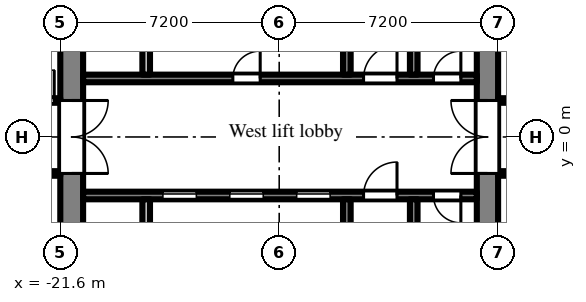
"""IFC4 building model, lengths in metres.
Left out: names, types, materials, properties, quantities, classifications, styles, units other than length and angle.
Written with IfcOpenShell. Run it as: python <this file> out.ifc"""

import sys

from ifc_helpers import new_model, si_unit, direction, frame, frame_2d, origin, place, context, subcontext, project, spatial, rectangle, extrude, element, fill, save


model = new_model("IFC4")
c1 = context("Model", 3, precision=1e-05, world=origin(), true_north=direction((0.0, 1.0)))
c2 = subcontext(c1, "Body", "Model", "MODEL_VIEW")
j1 = project(units=[si_unit("LENGTHUNIT", "METRE"), si_unit("PLANEANGLEUNIT", "RADIAN")], contexts=[c1])
p1 = place(None, origin())
s1 = spatial("IfcSite", under=j1, at=p1, CompositionType="ELEMENT")
p2 = place(p1, origin())
s2 = spatial("IfcBuilding", under=s1, at=p2, CompositionType="ELEMENT")
p3 = place(p2, frame((0.0, 0.0, 66.9)))
s3 = spatial("IfcBuildingStorey", under=s2, at=p3, CompositionType="ELEMENT", Elevation=66.9)
p4 = place(p3, frame((-7.55, -7.2, 0.0), z_axis=(0.0, 0.0, 1.0), x_axis=(0.0, 1.0, 0.0)))
e1 = element("IfcWall", 1, at=p4, inside=s3, PredefinedType="SHEAR", context=c2, shape_type="SweptSolid", body=[
    extrude(rectangle(XDim=14.4, YDim=0.7, at=frame_2d((7.2, 0.0))), origin(), (0.0, 0.0, 1.0), 2.575),
])
p5 = place(p4, frame((6.0, 0.0, 0.0)))
e2 = element("IfcOpeningElement", 2, at=p5, cuts=e1, PredefinedType="OPENING", context=c2, shape_type="SweptSolid", body=[
    extrude(rectangle(XDim=2.4, YDim=2.2, at=frame_2d((1.2, 1.1))), frame((0.0, 0.36, 0.0), z_axis=(0.0, -1.0, 0.0), x_axis=(1.0, 0.0, 0.0)), (0.0, 0.0, 1.0), 0.72),
])
p6 = place(p3, frame((-21.225, -7.2, 0.0), z_axis=(0.0, 0.0, 1.0), x_axis=(0.0, 1.0, 0.0)))
e3 = element("IfcWall", 3, at=p6, inside=s3, PredefinedType="SHEAR", context=c2, shape_type="SweptSolid", body=[
    extrude(rectangle(XDim=14.4, YDim=0.75, at=frame_2d((7.2, 0.0))), origin(), (0.0, 0.0, 1.0), 2.575),
])
p7 = place(p6, frame((6.0, 0.0, 0.0)))
e4 = element("IfcOpeningElement", 4, at=p7, cuts=e3, PredefinedType="OPENING", context=c2, shape_type="SweptSolid", body=[
    extrude(rectangle(XDim=2.4, YDim=2.2, at=frame_2d((1.2, 1.1))), frame((0.0, 0.385, 0.0), z_axis=(0.0, -1.0, 0.0), x_axis=(1.0, 0.0, 0.0)), (0.0, 0.0, 1.0), 0.77),
])
p8 = place(p3, frame((-7.9, 1.925, 0.0), z_axis=(0.0, 0.0, 1.0), x_axis=(-1.0, 0.0, 0.0)))
e5 = element("IfcWall", 5, at=p8, inside=s3, PredefinedType="SHEAR", context=c2, shape_type="SweptSolid", body=[
    extrude(rectangle(XDim=12.95, YDim=0.25, at=frame_2d((6.475, 0.0))), origin(), (0.0, 0.0, 1.0), 2.575),
])
p9 = place(p8, frame((0.525, 0.0, 0.0)))
e6 = element("IfcOpeningElement", 6, at=p9, cuts=e5, PredefinedType="OPENING", context=c2, shape_type="SweptSolid", body=[
    extrude(rectangle(XDim=0.9, YDim=2.1, at=frame_2d((0.45, 1.05))), frame((0.0, 0.135, 0.0), z_axis=(0.0, -1.0, 0.0), x_axis=(1.0, 0.0, 0.0)), (0.0, 0.0, 1.0), 0.27),
])
p10 = place(p8, frame((2.625, 0.0, 0.0)))
e7 = element("IfcOpeningElement", 7, at=p10, cuts=e5, PredefinedType="OPENING", context=c2, shape_type="SweptSolid", body=[
    extrude(rectangle(XDim=1.1, YDim=2.1, at=frame_2d((0.55, 1.05))), frame((0.0, 0.135, 0.0), z_axis=(0.0, -1.0, 0.0), x_axis=(1.0, 0.0, 0.0)), (0.0, 0.0, 1.0), 0.27),
])
p11 = place(p8, frame((7.125, 0.0, 0.0)))
e8 = element("IfcOpeningElement", 8, at=p11, cuts=e5, PredefinedType="OPENING", context=c2, shape_type="SweptSolid", body=[
    extrude(rectangle(XDim=0.9, YDim=2.1, at=frame_2d((0.45, 1.05))), frame((0.0, 0.135, 0.0), z_axis=(0.0, -1.0, 0.0), x_axis=(1.0, 0.0, 0.0)), (0.0, 0.0, 1.0), 0.27),
])
p12 = place(p3, frame((-9.975, 2.05, 0.0), z_axis=(0.0, 0.0, 1.0), x_axis=(0.0, 1.0, 0.0)))
e9 = element("IfcWall", 9, at=p12, inside=s3, PredefinedType="SHEAR", context=c2, shape_type="SweptSolid", body=[
    extrude(rectangle(XDim=4.65, YDim=0.25, at=frame_2d((2.325, 0.0))), origin(), (0.0, 0.0, 1.0), 2.575),
])
p13 = place(p12, frame((2.95, 0.0, 0.0)))
e10 = element("IfcOpeningElement", 10, at=p13, cuts=e9, PredefinedType="OPENING", context=c2, shape_type="SweptSolid", body=[
    extrude(rectangle(XDim=1.1, YDim=2.1, at=frame_2d((0.55, 1.05))), frame((0.0, 0.135, 0.0), z_axis=(0.0, -1.0, 0.0), x_axis=(1.0, 0.0, 0.0)), (0.0, 0.0, 1.0), 0.27),
])
p14 = place(p3, frame((-12.175, 2.05, 0.0), z_axis=(0.0, 0.0, 1.0), x_axis=(0.0, 1.0, 0.0)))
e11 = element("IfcWall", 11, at=p14, inside=s3, PredefinedType="SHEAR", context=c2, shape_type="SweptSolid", body=[
    extrude(rectangle(XDim=4.65, YDim=0.25, at=frame_2d((2.325, 0.0))), origin(), (0.0, 0.0, 1.0), 2.575),
])
p15 = place(p14, frame((2.95, 0.0, 0.0)))
e12 = element("IfcOpeningElement", 12, at=p15, cuts=e11, PredefinedType="OPENING", context=c2, shape_type="SweptSolid", body=[
    extrude(rectangle(XDim=1.1, YDim=2.1, at=frame_2d((0.55, 1.05))), frame((0.0, 0.135, 0.0), z_axis=(0.0, -1.0, 0.0), x_axis=(1.0, 0.0, 0.0)), (0.0, 0.0, 1.0), 0.27),
])
p16 = place(p3, frame((-18.775, 2.05, 0.0), z_axis=(0.0, 0.0, 1.0), x_axis=(0.0, 1.0, 0.0)))
e13 = element("IfcWall", 13, at=p16, inside=s3, PredefinedType="PARTITIONING", context=c2, shape_type="SweptSolid", body=[
    extrude(rectangle(XDim=2.1, YDim=0.25, at=frame_2d((1.05, 0.0))), origin(), (0.0, 0.0, 1.0), 2.575),
])
p17 = place(p3, frame((-7.9, -1.925, 0.0), z_axis=(0.0, 0.0, 1.0), x_axis=(-1.0, 0.0, 0.0)))
e14 = element("IfcWall", 14, at=p17, inside=s3, PredefinedType="SHEAR", context=c2, shape_type="SweptSolid", body=[
    extrude(rectangle(XDim=12.95, YDim=0.25, at=frame_2d((6.475, 0.0))), origin(), (0.0, 0.0, 1.0), 2.575),
])
p18 = place(p17, frame((4.825, 0.0, 0.0)))
e15 = element("IfcOpeningElement", 15, at=p18, cuts=e14, PredefinedType="OPENING", context=c2, shape_type="SweptSolid", body=[
    extrude(rectangle(XDim=1.1, YDim=2.1, at=frame_2d((0.55, 1.05))), frame((0.0, 0.135, 0.0), z_axis=(0.0, -1.0, 0.0), x_axis=(1.0, 0.0, 0.0)), (0.0, 0.0, 1.0), 0.27),
])
p19 = place(p17, frame((7.025, 0.0, 0.0)))
e16 = element("IfcOpeningElement", 16, at=p19, cuts=e14, PredefinedType="OPENING", context=c2, shape_type="SweptSolid", body=[
    extrude(rectangle(XDim=1.1, YDim=2.1, at=frame_2d((0.55, 1.05))), frame((0.0, 0.135, 0.0), z_axis=(0.0, -1.0, 0.0), x_axis=(1.0, 0.0, 0.0)), (0.0, 0.0, 1.0), 0.27),
])
p20 = place(p17, frame((9.225, 0.0, 0.0)))
e17 = element("IfcOpeningElement", 17, at=p20, cuts=e14, PredefinedType="OPENING", context=c2, shape_type="SweptSolid", body=[
    extrude(rectangle(XDim=1.1, YDim=2.1, at=frame_2d((0.55, 1.05))), frame((0.0, 0.135, 0.0), z_axis=(0.0, -1.0, 0.0), x_axis=(1.0, 0.0, 0.0)), (0.0, 0.0, 1.0), 0.27),
])
p21 = place(p17, frame((0.525, 0.0, 0.0)))
e18 = element("IfcOpeningElement", 18, at=p21, cuts=e14, PredefinedType="OPENING", context=c2, shape_type="SweptSolid", body=[
    extrude(rectangle(XDim=0.9, YDim=2.1, at=frame_2d((0.45, 1.05))), frame((0.0, 0.135, 0.0), z_axis=(0.0, -1.0, 0.0), x_axis=(1.0, 0.0, 0.0)), (0.0, 0.0, 1.0), 0.27),
])
p22 = place(p17, frame((2.625, 0.0, 0.0)))
e19 = element("IfcOpeningElement", 19, at=p22, cuts=e14, PredefinedType="OPENING", context=c2, shape_type="SweptSolid", body=[
    extrude(rectangle(XDim=1.1, YDim=2.1, at=frame_2d((0.55, 1.05))), frame((0.0, 0.135, 0.0), z_axis=(0.0, -1.0, 0.0), x_axis=(1.0, 0.0, 0.0)), (0.0, 0.0, 1.0), 0.27),
])
p23 = place(p3, frame((-9.975, -2.05, 0.0), z_axis=(0.0, 0.0, 1.0), x_axis=(0.0, -1.0, 0.0)))
e20 = element("IfcWall", 20, at=p23, inside=s3, PredefinedType="SHEAR", context=c2, shape_type="SweptSolid", body=[
    extrude(rectangle(XDim=4.65, YDim=0.25, at=frame_2d((2.325, 0.0))), origin(), (0.0, 0.0, 1.0), 2.575),
])
p24 = place(p23, frame((2.95, 0.0, 0.0)))
e21 = element("IfcOpeningElement", 21, at=p24, cuts=e20, PredefinedType="OPENING", context=c2, shape_type="SweptSolid", body=[
    extrude(rectangle(XDim=1.1, YDim=2.1, at=frame_2d((0.55, 1.05))), frame((0.0, 0.135, 0.0), z_axis=(0.0, -1.0, 0.0), x_axis=(1.0, 0.0, 0.0)), (0.0, 0.0, 1.0), 0.27),
])
p25 = place(p3, frame((-12.175, -2.05, 0.0), z_axis=(0.0, 0.0, 1.0), x_axis=(0.0, -1.0, 0.0)))
e22 = element("IfcWall", 22, at=p25, inside=s3, PredefinedType="SHEAR", context=c2, shape_type="SweptSolid", body=[
    extrude(rectangle(XDim=4.65, YDim=0.25, at=frame_2d((2.325, 0.0))), origin(), (0.0, 0.0, 1.0), 2.575),
])
p26 = place(p25, frame((2.95, 0.0, 0.0)))
e23 = element("IfcOpeningElement", 23, at=p26, cuts=e22, PredefinedType="OPENING", context=c2, shape_type="SweptSolid", body=[
    extrude(rectangle(XDim=1.1, YDim=2.1, at=frame_2d((0.55, 1.05))), frame((0.0, 0.135, 0.0), z_axis=(0.0, -1.0, 0.0), x_axis=(1.0, 0.0, 0.0)), (0.0, 0.0, 1.0), 0.27),
])
p27 = place(p3, frame((-18.775, -2.05, 0.0), z_axis=(0.0, 0.0, 1.0), x_axis=(0.0, -1.0, 0.0)))
e24 = element("IfcWall", 24, at=p27, inside=s3, PredefinedType="PARTITIONING", context=c2, shape_type="SweptSolid", body=[
    extrude(rectangle(XDim=2.1, YDim=0.25, at=frame_2d((1.05, 0.0))), origin(), (0.0, 0.0, 1.0), 2.575),
])
p28 = place(p3, frame((-36.5, -1.2, 0.0), z_axis=(0.0, 0.0, 1.0), x_axis=(1.0, 0.0, 0.0)))
e25 = element("IfcWall", 25, at=p28, inside=s3, PredefinedType="PARTITIONING", context=c2, shape_type="SweptSolid", body=[
    extrude(rectangle(XDim=14.9, YDim=0.15, at=frame_2d((7.45, 0.0))), origin(), (0.0, 0.0, 1.0), 2.575),
])
p29 = place(p28, frame((12.65, 0.0, 0.0)))
e26 = element("IfcOpeningElement", 26, at=p29, cuts=e25, PredefinedType="OPENING", context=c2, shape_type="SweptSolid", body=[
    extrude(rectangle(XDim=0.9, YDim=2.1, at=frame_2d((0.45, 1.05))), frame((0.0, 0.085, 0.0), z_axis=(0.0, -1.0, 0.0), x_axis=(1.0, 0.0, 0.0)), (0.0, 0.0, 1.0), 0.17),
])
p30 = place(p28, frame((9.95, 0.0, 0.0)))
e27 = element("IfcOpeningElement", 27, at=p30, cuts=e25, PredefinedType="OPENING", context=c2, shape_type="SweptSolid", body=[
    extrude(rectangle(XDim=0.9, YDim=2.1, at=frame_2d((0.45, 1.05))), frame((0.0, 0.085, 0.0), z_axis=(0.0, -1.0, 0.0), x_axis=(1.0, 0.0, 0.0)), (0.0, 0.0, 1.0), 0.17),
])
p31 = place(p28, frame((8.15, 0.0, 0.0)))
e28 = element("IfcOpeningElement", 28, at=p31, cuts=e25, PredefinedType="OPENING", context=c2, shape_type="SweptSolid", body=[
    extrude(rectangle(XDim=0.9, YDim=2.1, at=frame_2d((0.45, 1.05))), frame((0.0, 0.085, 0.0), z_axis=(0.0, -1.0, 0.0), x_axis=(1.0, 0.0, 0.0)), (0.0, 0.0, 1.0), 0.17),
])
p32 = place(p28, frame((6.1, 0.0, 0.0)))
e29 = element("IfcOpeningElement", 29, at=p32, cuts=e25, PredefinedType="OPENING", context=c2, shape_type="SweptSolid", body=[
    extrude(rectangle(XDim=1.0, YDim=2.1, at=frame_2d((0.5, 1.05))), frame((0.0, 0.085, 0.0), z_axis=(0.0, -1.0, 0.0), x_axis=(1.0, 0.0, 0.0)), (0.0, 0.0, 1.0), 0.17),
])
p33 = place(p28, frame((1.15, 0.0, 0.0)))
e30 = element("IfcOpeningElement", 30, at=p33, cuts=e25, PredefinedType="OPENING", context=c2, shape_type="SweptSolid", body=[
    extrude(rectangle(XDim=1.8, YDim=2.1, at=frame_2d((0.9, 1.05))), frame((0.0, 0.085, 0.0), z_axis=(0.0, -1.0, 0.0), x_axis=(1.0, 0.0, 0.0)), (0.0, 0.0, 1.0), 0.17),
])
p34 = place(p3, frame((-36.5, 1.2, 0.0), z_axis=(0.0, 0.0, 1.0), x_axis=(1.0, 0.0, 0.0)))
e31 = element("IfcWall", 31, at=p34, inside=s3, PredefinedType="PARTITIONING", context=c2, shape_type="SweptSolid", body=[
    extrude(rectangle(XDim=14.9, YDim=0.15, at=frame_2d((7.45, 0.0))), origin(), (0.0, 0.0, 1.0), 2.575),
])
p35 = place(p34, frame((13.7, 0.0, 0.0)))
e32 = element("IfcOpeningElement", 32, at=p35, cuts=e31, PredefinedType="OPENING", context=c2, shape_type="SweptSolid", body=[
    extrude(rectangle(XDim=1.0, YDim=2.1, at=frame_2d((0.5, 1.05))), frame((0.0, 0.085, 0.0), z_axis=(0.0, -1.0, 0.0), x_axis=(1.0, 0.0, 0.0)), (0.0, 0.0, 1.0), 0.17),
])
p36 = place(p34, frame((8.19, 0.0, 0.0)))
e33 = element("IfcOpeningElement", 33, at=p36, cuts=e31, PredefinedType="OPENING", context=c2, shape_type="SweptSolid", body=[
    extrude(rectangle(XDim=1.0, YDim=2.1, at=frame_2d((0.5, 1.05))), frame((0.0, 0.085, 0.0), z_axis=(0.0, -1.0, 0.0), x_axis=(1.0, 0.0, 0.0)), (0.0, 0.0, 1.0), 0.17),
])
p37 = place(p34, frame((1.15, 0.0, 0.0)))
e34 = element("IfcOpeningElement", 34, at=p37, cuts=e31, PredefinedType="OPENING", context=c2, shape_type="SweptSolid", body=[
    extrude(rectangle(XDim=1.8, YDim=2.1, at=frame_2d((0.9, 1.05))), frame((0.0, 0.085, 0.0), z_axis=(0.0, -1.0, 0.0), x_axis=(1.0, 0.0, 0.0)), (0.0, 0.0, 1.0), 0.17),
])
p38 = place(p3, frame((-7.2, -1.2, 0.0), z_axis=(0.0, 0.0, 1.0), x_axis=(1.0, 0.0, 0.0)))
e35 = element("IfcWall", 35, at=p38, inside=s3, PredefinedType="PARTITIONING", context=c2, shape_type="SweptSolid", body=[
    extrude(rectangle(XDim=6.075, YDim=0.15, at=frame_2d((3.038, 0.0))), origin(), (0.0, 0.0, 1.0), 2.575),
])
p39 = place(p38, frame((0.55, 0.0, 0.0)))
e36 = element("IfcOpeningElement", 36, at=p39, cuts=e35, PredefinedType="OPENING", context=c2, shape_type="SweptSolid", body=[
    extrude(rectangle(XDim=0.9, YDim=2.1, at=frame_2d((0.45, 1.05))), frame((0.0, 0.085, 0.0), z_axis=(0.0, -1.0, 0.0), x_axis=(1.0, 0.0, 0.0)), (0.0, 0.0, 1.0), 0.17),
])
p40 = place(p3, frame((-7.2, 1.2, 0.0), z_axis=(0.0, 0.0, 1.0), x_axis=(1.0, 0.0, 0.0)))
e37 = element("IfcWall", 37, at=p40, inside=s3, PredefinedType="PARTITIONING", context=c2, shape_type="SweptSolid", body=[
    extrude(rectangle(XDim=6.075, YDim=0.15, at=frame_2d((3.038, 0.0))), origin(), (0.0, 0.0, 1.0), 2.575),
])
p41 = place(p40, frame((1.95, 0.0, 0.0)))
e38 = element("IfcOpeningElement", 38, at=p41, cuts=e37, PredefinedType="OPENING", context=c2, shape_type="SweptSolid", body=[
    extrude(rectangle(XDim=0.9, YDim=2.1, at=frame_2d((0.45, 1.05))), frame((0.0, 0.085, 0.0), z_axis=(0.0, -1.0, 0.0), x_axis=(1.0, 0.0, 0.0)), (0.0, 0.0, 1.0), 0.17),
])
p42 = place(p18, origin())
e39 = element("IfcDoor", 39, at=p42, inside=s3, OperationType="SLIDING_TO_LEFT", PredefinedType="DOOR", context=c2, shape_type="SweptSolid", body=[
    extrude(rectangle(XDim=1.1, YDim=2.1, at=frame_2d((0.55, 1.05))), frame((0.0, 0.025, 0.0), z_axis=(0.0, -1.0, 0.0), x_axis=(1.0, 0.0, 0.0)), (0.0, 0.0, 1.0), 0.05),
])
fill(e15, e39)
p43 = place(p19, origin())
e40 = element("IfcDoor", 40, at=p43, inside=s3, OperationType="SLIDING_TO_LEFT", PredefinedType="DOOR", context=c2, shape_type="SweptSolid", body=[
    extrude(rectangle(XDim=1.1, YDim=2.1, at=frame_2d((0.55, 1.05))), frame((0.0, 0.025, 0.0), z_axis=(0.0, -1.0, 0.0), x_axis=(1.0, 0.0, 0.0)), (0.0, 0.0, 1.0), 0.05),
])
fill(e16, e40)
p44 = place(p20, origin())
e41 = element("IfcDoor", 41, at=p44, inside=s3, OperationType="SLIDING_TO_LEFT", PredefinedType="DOOR", context=c2, shape_type="SweptSolid", body=[
    extrude(rectangle(XDim=1.1, YDim=2.1, at=frame_2d((0.55, 1.05))), frame((0.0, 0.025, 0.0), z_axis=(0.0, -1.0, 0.0), x_axis=(1.0, 0.0, 0.0)), (0.0, 0.0, 1.0), 0.05),
])
fill(e17, e41)
p45 = place(p9, frame((0.9, 0.0, 0.0), z_axis=(0.0, 0.0, 1.0), x_axis=(-1.0, 0.0, 0.0)))
e42 = element("IfcDoor", 42, at=p45, inside=s3, OperationType="SINGLE_SWING_RIGHT", PredefinedType="DOOR", context=c2, shape_type="SweptSolid", body=[
    extrude(rectangle(XDim=0.9, YDim=2.1, at=frame_2d((0.45, 1.05))), frame((0.0, 0.025, 0.0), z_axis=(0.0, -1.0, 0.0), x_axis=(1.0, 0.0, 0.0)), (0.0, 0.0, 1.0), 0.05),
])
fill(e6, e42)
p46 = place(p21, origin())
e43 = element("IfcDoor", 43, at=p46, inside=s3, OperationType="SINGLE_SWING_LEFT", PredefinedType="DOOR", context=c2, shape_type="SweptSolid", body=[
    extrude(rectangle(XDim=0.9, YDim=2.1, at=frame_2d((0.45, 1.05))), frame((0.0, 0.025, 0.0), z_axis=(0.0, -1.0, 0.0), x_axis=(1.0, 0.0, 0.0)), (0.0, 0.0, 1.0), 0.05),
])
fill(e18, e43)
p47 = place(p10, frame((1.1, 0.0, 0.0), z_axis=(0.0, 0.0, 1.0), x_axis=(-1.0, 0.0, 0.0)))
e44 = element("IfcDoor", 44, at=p47, inside=s3, OperationType="SINGLE_SWING_RIGHT", PredefinedType="DOOR", context=c2, shape_type="SweptSolid", body=[
    extrude(rectangle(XDim=1.1, YDim=2.1, at=frame_2d((0.55, 1.05))), frame((0.0, 0.025, 0.0), z_axis=(0.0, -1.0, 0.0), x_axis=(1.0, 0.0, 0.0)), (0.0, 0.0, 1.0), 0.05),
])
fill(e7, e44)
p48 = place(p22, frame((1.1, 0.0, 0.0), z_axis=(0.0, 0.0, 1.0), x_axis=(-1.0, 0.0, 0.0)))
e45 = element("IfcDoor", 45, at=p48, inside=s3, OperationType="SINGLE_SWING_RIGHT", PredefinedType="DOOR", context=c2, shape_type="SweptSolid", body=[
    extrude(rectangle(XDim=1.1, YDim=2.1, at=frame_2d((0.55, 1.05))), frame((0.0, 0.025, 0.0), z_axis=(0.0, -1.0, 0.0), x_axis=(1.0, 0.0, 0.0)), (0.0, 0.0, 1.0), 0.05),
])
fill(e19, e45)
p49 = place(p5, origin())
e46 = element("IfcDoor", 46, at=p49, inside=s3, OperationType="DOUBLE_DOOR_DOUBLE_SWING", PredefinedType="DOOR", context=c2, shape_type="SweptSolid", body=[
    extrude(rectangle(XDim=2.4, YDim=2.2, at=frame_2d((1.2, 1.1))), frame((0.0, 0.025, 0.0), z_axis=(0.0, -1.0, 0.0), x_axis=(1.0, 0.0, 0.0)), (0.0, 0.0, 1.0), 0.05),
])
fill(e2, e46)
p50 = place(p7, frame((2.4, 0.0, 0.0), z_axis=(0.0, 0.0, 1.0), x_axis=(-1.0, 0.0, 0.0)))
e47 = element("IfcDoor", 47, at=p50, inside=s3, OperationType="DOUBLE_DOOR_DOUBLE_SWING", PredefinedType="DOOR", context=c2, shape_type="SweptSolid", body=[
    extrude(rectangle(XDim=2.4, YDim=2.2, at=frame_2d((1.2, 1.1))), frame((0.0, 0.025, 0.0), z_axis=(0.0, -1.0, 0.0), x_axis=(1.0, 0.0, 0.0)), (0.0, 0.0, 1.0), 0.05),
])
fill(e4, e47)
p51 = place(p11, frame((0.9, 0.0, 0.0), z_axis=(0.0, 0.0, 1.0), x_axis=(-1.0, 0.0, 0.0)))
e48 = element("IfcDoor", 48, at=p51, inside=s3, OperationType="SINGLE_SWING_RIGHT", PredefinedType="DOOR", context=c2, shape_type="SweptSolid", body=[
    extrude(rectangle(XDim=0.9, YDim=2.1, at=frame_2d((0.45, 1.05))), frame((0.0, 0.025, 0.0), z_axis=(0.0, -1.0, 0.0), x_axis=(1.0, 0.0, 0.0)), (0.0, 0.0, 1.0), 0.05),
])
fill(e8, e48)
p52 = place(p35, origin())
e49 = element("IfcDoor", 49, at=p52, inside=s3, OperationType="SINGLE_SWING_RIGHT", PredefinedType="DOOR", context=c2, shape_type="SweptSolid", body=[
    extrude(rectangle(XDim=1.0, YDim=2.1, at=frame_2d((0.5, 1.05))), frame((0.0, 0.025, 0.0), z_axis=(0.0, -1.0, 0.0), x_axis=(1.0, 0.0, 0.0)), (0.0, 0.0, 1.0), 0.05),
])
fill(e32, e49)
save(model, sys.argv[1])
